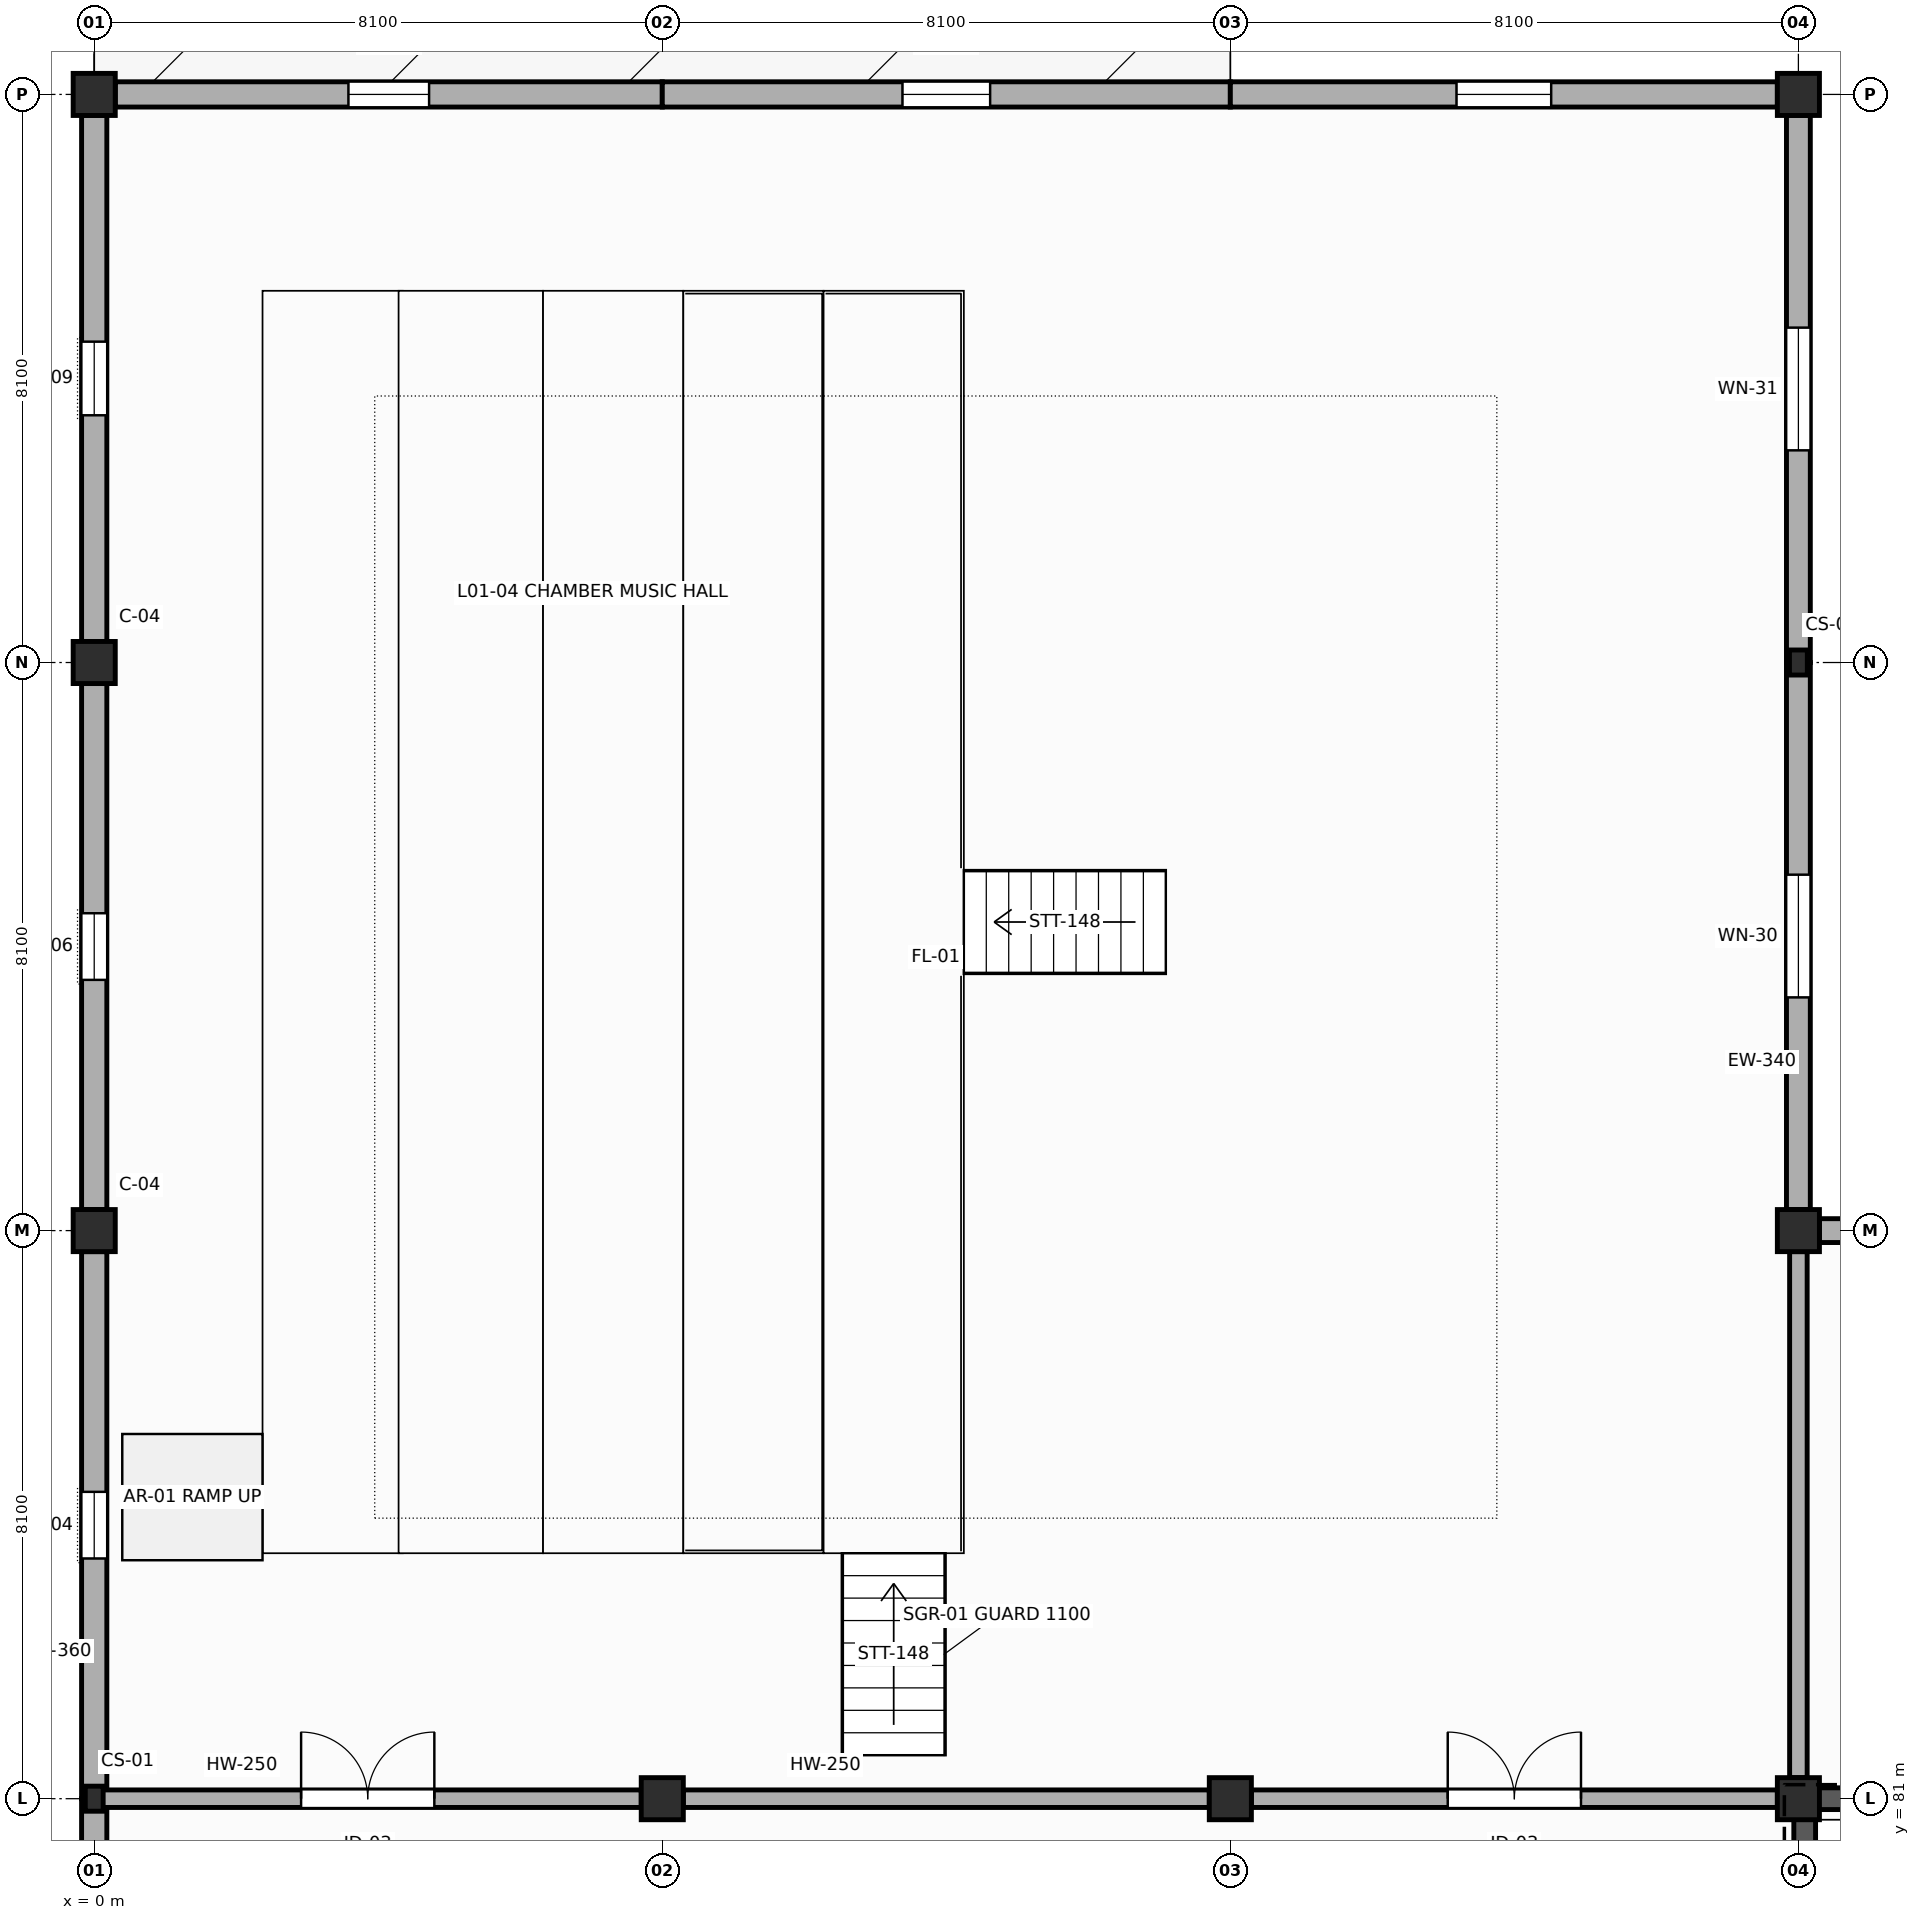
"""IFC4 building model, lengths in metres.
Left out: names, types, materials, properties, quantities, classifications, styles, units other than length and angle.
Written with IfcOpenShell. Run it as: python <this file> out.ifc"""

import sys

from ifc_helpers import new_model, si_unit, direction, frame, frame_2d, origin, origin_2d, place, context, subcontext, project, spatial, rectangle, i_section, extrude, element, fill, save


model = new_model("IFC4")
c1 = context("Model", 3, precision=1e-05, world=origin(), true_north=direction((0.0, 1.0)))
c2 = subcontext(c1, "Body", "Model", "MODEL_VIEW")
j1 = project(units=[si_unit("LENGTHUNIT", "METRE"), si_unit("PLANEANGLEUNIT", "RADIAN")], contexts=[c1])
p1 = place(None, origin())
s1 = spatial("IfcSite", under=j1, at=p1, CompositionType="ELEMENT")
p2 = place(p1, origin())
s2 = spatial("IfcBuilding", under=s1, at=p2, CompositionType="ELEMENT")
p3 = place(p2, frame((0.0, 0.0, 5.4)))
s3 = spatial("IfcBuildingStorey", under=s2, at=p3, CompositionType="ELEMENT", Elevation=5.4)
p4 = place(p3, frame((0.0, 81.0, 0.0), z_axis=(0.0, 0.0, 1.0), x_axis=(1.0, 0.0, 0.0)))
e1 = element("IfcColumn", 1, at=p4, inside=s3, PredefinedType="COLUMN", context=c2, shape_type="SweptSolid", body=[
    extrude(i_section(OverallWidth=0.255, OverallDepth=0.357, WebThickness=0.01, FlangeThickness=0.018, FilletRadius=0.015, at=origin_2d()), origin(), (0.0, 0.0, 1.0), 4.8),
])
for number, where, z_axis, x_axis in (
    (2, (0.0, 89.1, 0.0), (0.0, 0.0, 1.0), (1.0, 0.0, 0.0)),
    (3, (0.0, 97.2, 0.0), (0.0, 0.0, 1.0), (1.0, 0.0, 0.0)),
    (4, (0.0, 105.3, 0.0), (0.0, 0.0, 1.0), (1.0, 0.0, 0.0)),
    (5, (8.1, 81.0, 0.0), (0.0, 0.0, 1.0), (1.0, 0.0, 0.0)),
    (6, (16.2, 81.0, 0.0), (0.0, 0.0, 1.0), (1.0, 0.0, 0.0)),
    (7, (24.3, 81.0, 0.0), (0.0, 0.0, 1.0), (1.0, 0.0, 0.0)),
    (8, (24.3, 89.1, 0.0), (0.0, 0.0, 1.0), (1.0, 0.0, 0.0)),
):
    element("IfcColumn", number, at=place(p3, frame(where, z_axis=z_axis, x_axis=x_axis)), inside=s3, PredefinedType="COLUMN", context=c2, shape_type="SweptSolid", body=[
        extrude(rectangle(XDim=0.6, YDim=0.6, at=origin_2d()), origin(), (0.0, 0.0, 1.0), 4.8),
    ])
p5 = place(p3, frame((24.3, 97.2, 0.0), z_axis=(0.0, 0.0, 1.0), x_axis=(1.0, 0.0, 0.0)))
e9 = element("IfcColumn", 9, at=p5, inside=s3, PredefinedType="COLUMN", context=c2, shape_type="SweptSolid", body=[
    extrude(i_section(OverallWidth=0.255, OverallDepth=0.357, WebThickness=0.01, FlangeThickness=0.018, FilletRadius=0.015, at=origin_2d()), origin(), (0.0, 0.0, 1.0), 4.8),
])
p6 = place(p3, frame((24.3, 105.3, 0.0), z_axis=(0.0, 0.0, 1.0), x_axis=(1.0, 0.0, 0.0)))
e10 = element("IfcColumn", 10, at=p6, inside=s3, PredefinedType="COLUMN", context=c2, shape_type="SweptSolid", body=[
    extrude(rectangle(XDim=0.6, YDim=0.6, at=origin_2d()), origin(), (0.0, 0.0, 1.0), 4.8),
])
p7 = place(p3, frame((0.0, 73.2, 0.0), z_axis=(0.0, 0.0, 1.0), x_axis=(0.0, 1.0, 0.0)))
e11 = element("IfcWall", 11, at=p7, inside=s3, PredefinedType="SOLIDWALL", context=c2, shape_type="SweptSolid", body=[
    extrude(rectangle(XDim=7.8, YDim=0.36, at=frame_2d((3.9, 0.0))), origin(), (0.0, 0.0, 1.0), 4.197),
])
p8 = place(p7, frame((3.475, 0.0, 0.9)))
e12 = element("IfcOpeningElement", 12, at=p8, cuts=e11, PredefinedType="OPENING", context=c2, shape_type="SweptSolid", body=[
    extrude(rectangle(XDim=0.85, YDim=1.45, at=frame_2d((0.425, 0.725))), frame((0.0, 0.19, 0.0), z_axis=(0.0, -1.0, 0.0), x_axis=(1.0, 0.0, 0.0)), (0.0, 0.0, 1.0), 0.38),
])
p9 = place(p3, frame((0.0, 81.0, 0.0), z_axis=(0.0, 0.0, 1.0), x_axis=(0.0, 1.0, 0.0)))
e13 = element("IfcWall", 13, at=p9, inside=s3, PredefinedType="SOLIDWALL", context=c2, shape_type="SweptSolid", body=[
    extrude(rectangle(XDim=7.8, YDim=0.36, at=frame_2d((3.9, 0.0))), origin(), (0.0, 0.0, 1.0), 4.197),
])
p10 = place(p9, frame((3.425, 0.0, 0.9)))
e14 = element("IfcOpeningElement", 14, at=p10, cuts=e13, PredefinedType="OPENING", context=c2, shape_type="SweptSolid", body=[
    extrude(rectangle(XDim=0.95, YDim=1.25, at=frame_2d((0.475, 0.625))), frame((0.0, 0.19, 0.0), z_axis=(0.0, -1.0, 0.0), x_axis=(1.0, 0.0, 0.0)), (0.0, 0.0, 1.0), 0.38),
])
p11 = place(p3, frame((0.0, 89.4, 0.0), z_axis=(0.0, 0.0, 1.0), x_axis=(0.0, 1.0, 0.0)))
e15 = element("IfcWall", 15, at=p11, inside=s3, PredefinedType="SOLIDWALL", context=c2, shape_type="SweptSolid", body=[
    extrude(rectangle(XDim=7.5, YDim=0.36, at=frame_2d((3.75, 0.0))), origin(), (0.0, 0.0, 1.0), 4.8),
])
p12 = place(p11, frame((3.275, 0.0, 0.9)))
e16 = element("IfcOpeningElement", 16, at=p12, cuts=e15, PredefinedType="OPENING", context=c2, shape_type="SweptSolid", body=[
    extrude(rectangle(XDim=0.95, YDim=1.85, at=frame_2d((0.475, 0.925))), frame((0.0, 0.19, 0.0), z_axis=(0.0, -1.0, 0.0), x_axis=(1.0, 0.0, 0.0)), (0.0, 0.0, 1.0), 0.38),
])
p13 = place(p3, frame((0.0, 97.5, 0.0), z_axis=(0.0, 0.0, 1.0), x_axis=(0.0, 1.0, 0.0)))
e17 = element("IfcWall", 17, at=p13, inside=s3, PredefinedType="SOLIDWALL", context=c2, shape_type="SweptSolid", body=[
    extrude(rectangle(XDim=7.5, YDim=0.36, at=frame_2d((3.75, 0.0))), origin(), (0.0, 0.0, 1.0), 4.8),
])
p14 = place(p13, frame((3.225, 0.0, 0.9)))
e18 = element("IfcOpeningElement", 18, at=p14, cuts=e17, PredefinedType="OPENING", context=c2, shape_type="SweptSolid", body=[
    extrude(rectangle(XDim=1.05, YDim=1.95, at=frame_2d((0.525, 0.975))), frame((0.0, 0.19, 0.0), z_axis=(0.0, -1.0, 0.0), x_axis=(1.0, 0.0, 0.0)), (0.0, 0.0, 1.0), 0.38),
])
p15 = place(p3, frame((0.3, 105.3, 0.0), z_axis=(0.0, 0.0, 1.0), x_axis=(1.0, 0.0, 0.0)))
e19 = element("IfcWall", 19, at=p15, inside=s3, PredefinedType="SOLIDWALL", context=c2, shape_type="SweptSolid", body=[
    extrude(rectangle(XDim=7.8, YDim=0.36, at=frame_2d((3.9, 0.0))), origin(), (0.0, 0.0, 1.0), 4.8),
])
p16 = place(p15, frame((3.325, 0.0, 0.9)))
e20 = element("IfcOpeningElement", 20, at=p16, cuts=e19, PredefinedType="OPENING", context=c2, shape_type="SweptSolid", body=[
    extrude(rectangle(XDim=1.15, YDim=2.05, at=frame_2d((0.575, 1.025))), frame((0.0, 0.19, 0.0), z_axis=(0.0, -1.0, 0.0), x_axis=(1.0, 0.0, 0.0)), (0.0, 0.0, 1.0), 0.38),
])
p17 = place(p3, frame((8.1, 105.3, 0.0), z_axis=(0.0, 0.0, 1.0), x_axis=(1.0, 0.0, 0.0)))
e21 = element("IfcWall", 21, at=p17, inside=s3, PredefinedType="SOLIDWALL", context=c2, shape_type="SweptSolid", body=[
    extrude(rectangle(XDim=8.1, YDim=0.36, at=frame_2d((4.05, 0.0))), origin(), (0.0, 0.0, 1.0), 4.8),
])
p18 = place(p17, frame((3.425, 0.0, 0.9)))
e22 = element("IfcOpeningElement", 22, at=p18, cuts=e21, PredefinedType="OPENING", context=c2, shape_type="SweptSolid", body=[
    extrude(rectangle(XDim=1.25, YDim=1.85, at=frame_2d((0.625, 0.925))), frame((0.0, 0.19, 0.0), z_axis=(0.0, -1.0, 0.0), x_axis=(1.0, 0.0, 0.0)), (0.0, 0.0, 1.0), 0.38),
])
p19 = place(p3, frame((16.2, 105.3, 0.0), z_axis=(0.0, 0.0, 1.0), x_axis=(1.0, 0.0, 0.0)))
e23 = element("IfcWall", 23, at=p19, inside=s3, PredefinedType="SOLIDWALL", context=c2, shape_type="SweptSolid", body=[
    extrude(rectangle(XDim=7.8, YDim=0.36, at=frame_2d((3.9, 0.0))), origin(), (0.0, 0.0, 1.0), 4.8),
])
p20 = place(p19, frame((3.225, 0.0, 0.9)))
e24 = element("IfcOpeningElement", 24, at=p20, cuts=e23, PredefinedType="OPENING", context=c2, shape_type="SweptSolid", body=[
    extrude(rectangle(XDim=1.35, YDim=1.75, at=frame_2d((0.675, 0.875))), frame((0.0, 0.19, 0.0), z_axis=(0.0, -1.0, 0.0), x_axis=(1.0, 0.0, 0.0)), (0.0, 0.0, 1.0), 0.38),
])
p21 = place(p3, frame((32.05, 89.1, 0.0), z_axis=(0.0, 0.0, 1.0), x_axis=(-1.0, 0.0, 0.0)))
e25 = element("IfcWall", 25, at=p21, inside=s3, PredefinedType="SOLIDWALL", context=c2, shape_type="SweptSolid", body=[
    extrude(rectangle(XDim=7.45, YDim=0.34, at=frame_2d((3.725, 0.0))), origin(), (0.0, 0.0, 1.0), 4.085),
])
p22 = place(p21, frame((2.9, 0.0, 0.9)))
e26 = element("IfcOpeningElement", 26, at=p22, cuts=e25, PredefinedType="OPENING", context=c2, shape_type="SweptSolid", body=[
    extrude(rectangle(XDim=1.65, YDim=2.15, at=frame_2d((0.825, 1.075))), frame((0.0, 0.18, 0.0), z_axis=(0.0, -1.0, 0.0), x_axis=(1.0, 0.0, 0.0)), (0.0, 0.0, 1.0), 0.36),
])
p23 = place(p3, frame((24.3, 89.4, 0.0), z_axis=(0.0, 0.0, 1.0), x_axis=(0.0, 1.0, 0.0)))
e27 = element("IfcWall", 27, at=p23, inside=s3, PredefinedType="SOLIDWALL", context=c2, shape_type="SweptSolid", body=[
    extrude(rectangle(XDim=7.8, YDim=0.34, at=frame_2d((3.9, 0.0))), origin(), (0.0, 0.0, 1.0), 4.8),
])
p24 = place(p23, frame((3.025, 0.0, 0.9)))
e28 = element("IfcOpeningElement", 28, at=p24, cuts=e27, PredefinedType="OPENING", context=c2, shape_type="SweptSolid", body=[
    extrude(rectangle(XDim=1.75, YDim=1.5, at=frame_2d((0.875, 0.75))), frame((0.0, 0.18, 0.0), z_axis=(0.0, -1.0, 0.0), x_axis=(1.0, 0.0, 0.0)), (0.0, 0.0, 1.0), 0.36),
])
p25 = place(p3, frame((24.3, 97.2, 0.0), z_axis=(0.0, 0.0, 1.0), x_axis=(0.0, 1.0, 0.0)))
e29 = element("IfcWall", 29, at=p25, inside=s3, PredefinedType="SOLIDWALL", context=c2, shape_type="SweptSolid", body=[
    extrude(rectangle(XDim=7.8, YDim=0.34, at=frame_2d((3.9, 0.0))), origin(), (0.0, 0.0, 1.0), 4.8),
])
p26 = place(p25, frame((3.025, 0.0, 0.9)))
e30 = element("IfcOpeningElement", 30, at=p26, cuts=e29, PredefinedType="OPENING", context=c2, shape_type="SweptSolid", body=[
    extrude(rectangle(XDim=1.75, YDim=1.9, at=frame_2d((0.875, 0.95))), frame((0.0, 0.18, 0.0), z_axis=(0.0, -1.0, 0.0), x_axis=(1.0, 0.0, 0.0)), (0.0, 0.0, 1.0), 0.36),
])
p27 = place(p3, frame((24.39, 77.51, 0.0), z_axis=(0.0, 0.0, 1.0), x_axis=(0.0, 1.0, 0.0)))
e31 = element("IfcWall", 31, at=p27, inside=s3, PredefinedType="SHEAR", context=c2, shape_type="SweptSolid", body=[
    extrude(rectangle(XDim=3.49, YDim=0.31, at=frame_2d((1.745, 0.0))), origin(), (0.0, 0.0, 1.0), 4.8),
])
p28 = place(p27, frame((1.145, 0.0, 0.0)))
e32 = element("IfcOpeningElement", 32, at=p28, cuts=e31, PredefinedType="OPENING", context=c2, shape_type="SweptSolid", body=[
    extrude(rectangle(XDim=1.2, YDim=2.2, at=frame_2d((0.6, 1.1))), frame((0.0, 0.165, 0.0), z_axis=(0.0, -1.0, 0.0), x_axis=(1.0, 0.0, 0.0)), (0.0, 0.0, 1.0), 0.33),
])
p29 = place(p3, frame((24.39, 81.0, 0.0), z_axis=(0.0, 0.0, 1.0), x_axis=(1.0, 0.0, 0.0)))
e33 = element("IfcWall", 33, at=p29, inside=s3, PredefinedType="SHEAR", context=c2, shape_type="SweptSolid", body=[
    extrude(rectangle(XDim=3.96, YDim=0.31, at=frame_2d((1.98, 0.0))), origin(), (0.0, 0.0, 1.0), 4.8),
])
p30 = place(p3, frame((0.0, 81.0, 0.0), z_axis=(0.0, 0.0, 1.0), x_axis=(1.0, 0.0, 0.0)))
e34 = element("IfcWall", 34, at=p30, inside=s3, PredefinedType="SOLIDWALL", context=c2, shape_type="SweptSolid", body=[
    extrude(rectangle(XDim=7.8, YDim=0.25, at=frame_2d((3.9, 0.0))), origin(), (0.0, 0.0, 1.0), 4.085),
])
p31 = place(p30, frame((2.95, 0.0, 0.0)))
e35 = element("IfcOpeningElement", 35, at=p31, cuts=e34, PredefinedType="OPENING", context=c2, shape_type="SweptSolid", body=[
    extrude(rectangle(XDim=1.9, YDim=2.4, at=frame_2d((0.95, 1.2))), frame((0.0, 0.135, 0.0), z_axis=(0.0, -1.0, 0.0), x_axis=(1.0, 0.0, 0.0)), (0.0, 0.0, 1.0), 0.27),
])
p32 = place(p3, frame((8.4, 81.0, 0.0), z_axis=(0.0, 0.0, 1.0), x_axis=(1.0, 0.0, 0.0)))
e36 = element("IfcWall", 36, at=p32, inside=s3, PredefinedType="SOLIDWALL", context=c2, shape_type="SweptSolid", body=[
    extrude(rectangle(XDim=7.5, YDim=0.25, at=frame_2d((3.75, 0.0))), origin(), (0.0, 0.0, 1.0), 4.137),
])
p33 = place(p3, frame((16.5, 81.0, 0.0), z_axis=(0.0, 0.0, 1.0), x_axis=(1.0, 0.0, 0.0)))
e37 = element("IfcWall", 37, at=p33, inside=s3, PredefinedType="SOLIDWALL", context=c2, shape_type="SweptSolid", body=[
    extrude(rectangle(XDim=7.5, YDim=0.25, at=frame_2d((3.75, 0.0))), origin(), (0.0, 0.0, 1.0), 4.085),
])
p34 = place(p33, frame((2.8, 0.0, 0.0)))
e38 = element("IfcOpeningElement", 38, at=p34, cuts=e37, PredefinedType="OPENING", context=c2, shape_type="SweptSolid", body=[
    extrude(rectangle(XDim=1.9, YDim=2.4, at=frame_2d((0.95, 1.2))), frame((0.0, 0.135, 0.0), z_axis=(0.0, -1.0, 0.0), x_axis=(1.0, 0.0, 0.0)), (0.0, 0.0, 1.0), 0.27),
])
p35 = place(p3, frame((24.3, 81.3, 0.0), z_axis=(0.0, 0.0, 1.0), x_axis=(0.0, 1.0, 0.0)))
e39 = element("IfcWall", 39, at=p35, inside=s3, PredefinedType="SOLIDWALL", context=c2, shape_type="SweptSolid", body=[
    extrude(rectangle(XDim=7.5, YDim=0.25, at=frame_2d((3.75, 0.0))), origin(), (0.0, 0.0, 1.0), 4.197),
])
p36 = place(p10, origin())
e40 = element("IfcWindow", 40, at=p36, inside=s3, PartitioningType="SINGLE_PANEL", PredefinedType="WINDOW", context=c2, shape_type="SweptSolid", body=[
    extrude(rectangle(XDim=0.95, YDim=1.25, at=frame_2d((0.475, 0.625))), frame((0.0, 0.03, 0.0), z_axis=(0.0, -1.0, 0.0), x_axis=(1.0, 0.0, 0.0)), (0.0, 0.0, 1.0), 0.06),
])
fill(e14, e40)
p37 = place(p12, origin())
e41 = element("IfcWindow", 41, at=p37, inside=s3, PartitioningType="SINGLE_PANEL", PredefinedType="WINDOW", context=c2, shape_type="SweptSolid", body=[
    extrude(rectangle(XDim=0.95, YDim=1.85, at=frame_2d((0.475, 0.925))), frame((0.0, 0.03, 0.0), z_axis=(0.0, -1.0, 0.0), x_axis=(1.0, 0.0, 0.0)), (0.0, 0.0, 1.0), 0.06),
])
fill(e16, e41)
p38 = place(p14, origin())
e42 = element("IfcWindow", 42, at=p38, inside=s3, PartitioningType="SINGLE_PANEL", PredefinedType="WINDOW", context=c2, shape_type="SweptSolid", body=[
    extrude(rectangle(XDim=1.05, YDim=1.95, at=frame_2d((0.525, 0.975))), frame((0.0, 0.03, 0.0), z_axis=(0.0, -1.0, 0.0), x_axis=(1.0, 0.0, 0.0)), (0.0, 0.0, 1.0), 0.06),
])
fill(e18, e42)
p39 = place(p16, origin())
e43 = element("IfcWindow", 43, at=p39, inside=s3, PartitioningType="SINGLE_PANEL", PredefinedType="WINDOW", context=c2, shape_type="SweptSolid", body=[
    extrude(rectangle(XDim=1.15, YDim=2.05, at=frame_2d((0.575, 1.025))), frame((0.0, 0.03, 0.0), z_axis=(0.0, -1.0, 0.0), x_axis=(1.0, 0.0, 0.0)), (0.0, 0.0, 1.0), 0.06),
])
fill(e20, e43)
p40 = place(p18, origin())
e44 = element("IfcWindow", 44, at=p40, inside=s3, PartitioningType="SINGLE_PANEL", PredefinedType="WINDOW", context=c2, shape_type="SweptSolid", body=[
    extrude(rectangle(XDim=1.25, YDim=1.85, at=frame_2d((0.625, 0.925))), frame((0.0, 0.03, 0.0), z_axis=(0.0, -1.0, 0.0), x_axis=(1.0, 0.0, 0.0)), (0.0, 0.0, 1.0), 0.06),
])
fill(e22, e44)
p41 = place(p20, origin())
e45 = element("IfcWindow", 45, at=p41, inside=s3, PartitioningType="SINGLE_PANEL", PredefinedType="WINDOW", context=c2, shape_type="SweptSolid", body=[
    extrude(rectangle(XDim=1.35, YDim=1.75, at=frame_2d((0.675, 0.875))), frame((0.0, 0.03, 0.0), z_axis=(0.0, -1.0, 0.0), x_axis=(1.0, 0.0, 0.0)), (0.0, 0.0, 1.0), 0.06),
])
fill(e24, e45)
p42 = place(p24, origin())
e46 = element("IfcWindow", 46, at=p42, inside=s3, PartitioningType="SINGLE_PANEL", PredefinedType="WINDOW", context=c2, shape_type="SweptSolid", body=[
    extrude(rectangle(XDim=1.75, YDim=1.5, at=frame_2d((0.875, 0.75))), frame((0.0, 0.03, 0.0), z_axis=(0.0, -1.0, 0.0), x_axis=(1.0, 0.0, 0.0)), (0.0, 0.0, 1.0), 0.06),
])
fill(e28, e46)
p43 = place(p26, origin())
e47 = element("IfcWindow", 47, at=p43, inside=s3, PartitioningType="SINGLE_PANEL", PredefinedType="WINDOW", context=c2, shape_type="SweptSolid", body=[
    extrude(rectangle(XDim=1.75, YDim=1.9, at=frame_2d((0.875, 0.95))), frame((0.0, 0.03, 0.0), z_axis=(0.0, -1.0, 0.0), x_axis=(1.0, 0.0, 0.0)), (0.0, 0.0, 1.0), 0.06),
])
fill(e30, e47)
p44 = place(p31, origin())
e48 = element("IfcDoor", 48, at=p44, inside=s3, OperationType="DOUBLE_DOOR_SINGLE_SWING", PredefinedType="DOOR", context=c2, shape_type="SweptSolid", body=[
    extrude(rectangle(XDim=1.9, YDim=2.4, at=frame_2d((0.95, 1.2))), frame((0.0, 0.025, 0.0), z_axis=(0.0, -1.0, 0.0), x_axis=(1.0, 0.0, 0.0)), (0.0, 0.0, 1.0), 0.05),
])
fill(e35, e48)
p45 = place(p34, origin())
e49 = element("IfcDoor", 49, at=p45, inside=s3, OperationType="DOUBLE_DOOR_SINGLE_SWING", PredefinedType="DOOR", context=c2, shape_type="SweptSolid", body=[
    extrude(rectangle(XDim=1.9, YDim=2.4, at=frame_2d((0.95, 1.2))), frame((0.0, 0.025, 0.0), z_axis=(0.0, -1.0, 0.0), x_axis=(1.0, 0.0, 0.0)), (0.0, 0.0, 1.0), 0.05),
])
fill(e38, e49)
save(model, sys.argv[1])
